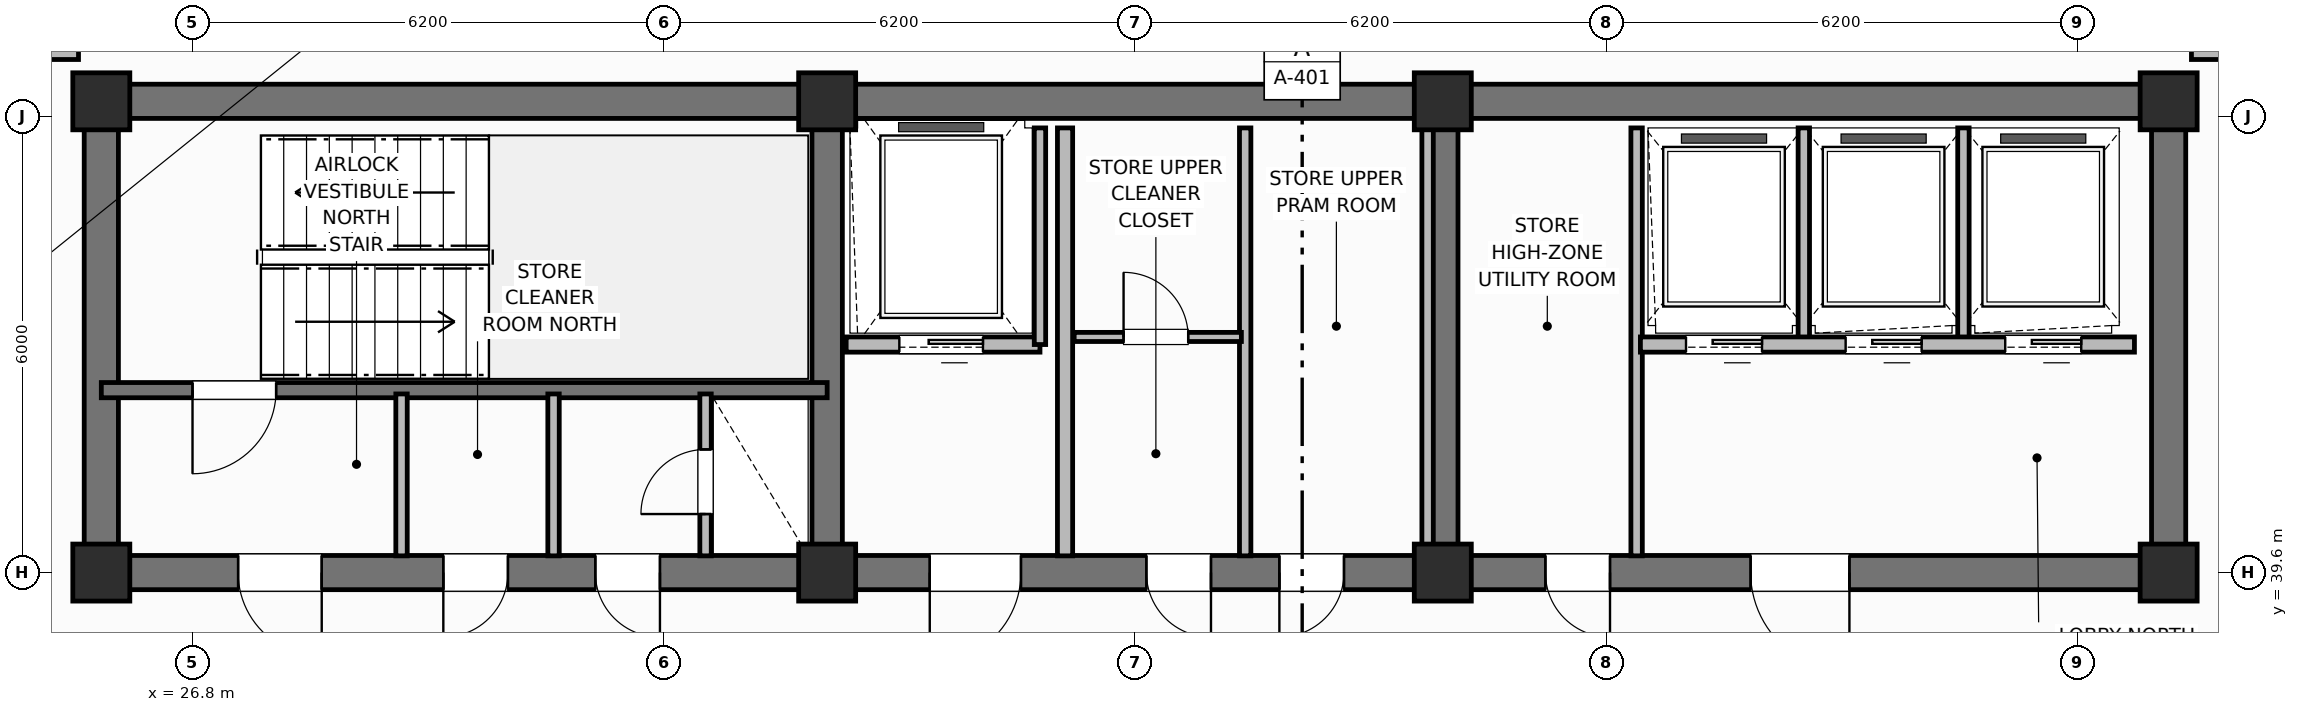
"""IFC4 building model, lengths in metres.
Left out: names, types, materials, properties, quantities, classifications, styles, units other than length and angle.
Written with IfcOpenShell. Run it as: python <this file> out.ifc"""

import sys

from ifc_helpers import new_model, si_unit, direction, frame, frame_2d, origin, origin_2d, place, context, subcontext, project, spatial, rectangle, extrude, element, fill, save


model = new_model("IFC4")
c1 = context("Model", 3, precision=1e-05, world=origin(), true_north=direction((0.0, 1.0)))
c2 = subcontext(c1, "Body", "Model", "MODEL_VIEW")
j1 = project(units=[si_unit("LENGTHUNIT", "METRE"), si_unit("PLANEANGLEUNIT", "RADIAN")], contexts=[c1])
p1 = place(None, origin())
s1 = spatial("IfcSite", under=j1, at=p1, CompositionType="ELEMENT")
p2 = place(p1, origin())
s2 = spatial("IfcBuilding", under=s1, at=p2, CompositionType="ELEMENT")
p3 = place(p2, frame((0.0, 0.0, 289.8)))
s3 = spatial("IfcBuildingStorey", under=s2, at=p3, CompositionType="ELEMENT", Elevation=289.8)
p4 = place(p3, frame((25.6, 45.8, 0.0), z_axis=(0.0, 0.0, 1.0), x_axis=(1.0, 0.0, 0.0)))
e1 = element("IfcWall", 1, at=p4, inside=s3, PredefinedType="SHEAR", context=c2, shape_type="SweptSolid", body=[
    extrude(rectangle(XDim=27.2, YDim=0.45, at=frame_2d((13.6, 0.0))), origin(), (0.0, 0.0, 1.0), 3.7),
])
for number, where, z_axis, x_axis in (
    (2, (25.6, 39.825, 0.0), (0.0, 0.0, 1.0), (0.0, 1.0, 0.0)),
    (3, (52.8, 39.825, 0.0), (0.0, 0.0, 1.0), (0.0, 1.0, 0.0)),
):
    element("IfcWall", number, at=place(p3, frame(where, z_axis=z_axis, x_axis=x_axis)), inside=s3, PredefinedType="SHEAR", context=c2, shape_type="SweptSolid", body=[
        extrude(rectangle(XDim=5.75, YDim=0.45, at=frame_2d((2.875, 0.0))), origin(), (0.0, 0.0, 1.0), 3.7),
    ])
p5 = place(p3, frame((52.8, 39.6, 0.0), z_axis=(0.0, 0.0, 1.0), x_axis=(-1.0, 0.0, 0.0)))
e4 = element("IfcWall", 4, at=p5, inside=s3, PredefinedType="SHEAR", context=c2, shape_type="SweptSolid", body=[
    extrude(rectangle(XDim=27.2, YDim=0.45, at=frame_2d((13.6, 0.0))), origin(), (0.0, 0.0, 1.0), 3.7),
])
p6 = place(p5, frame((24.3, 0.0, 0.0)))
e5 = element("IfcOpeningElement", 5, at=p6, cuts=e4, PredefinedType="OPENING", context=c2, shape_type="SweptSolid", body=[
    extrude(rectangle(XDim=1.1, YDim=2.15, at=frame_2d((0.55, 1.075))), frame((0.0, 0.235, 0.0), z_axis=(0.0, -1.0, 0.0), x_axis=(1.0, 0.0, 0.0)), (0.0, 0.0, 1.0), 0.47),
])
p7 = place(p5, frame((21.85, 0.0, 0.0)))
e6 = element("IfcOpeningElement", 6, at=p7, cuts=e4, PredefinedType="OPENING", context=c2, shape_type="SweptSolid", body=[
    extrude(rectangle(XDim=0.85, YDim=2.1, at=frame_2d((0.425, 1.05))), frame((0.0, 0.235, 0.0), z_axis=(0.0, -1.0, 0.0), x_axis=(1.0, 0.0, 0.0)), (0.0, 0.0, 1.0), 0.47),
])
p8 = place(p5, frame((19.85, 0.0, 0.0)))
e7 = element("IfcOpeningElement", 7, at=p8, cuts=e4, PredefinedType="OPENING", context=c2, shape_type="SweptSolid", body=[
    extrude(rectangle(XDim=0.85, YDim=2.1, at=frame_2d((0.425, 1.05))), frame((0.0, 0.235, 0.0), z_axis=(0.0, -1.0, 0.0), x_axis=(1.0, 0.0, 0.0)), (0.0, 0.0, 1.0), 0.47),
])
p9 = place(p5, frame((15.1, 0.0, 0.0)))
e8 = element("IfcOpeningElement", 8, at=p9, cuts=e4, PredefinedType="OPENING", context=c2, shape_type="SweptSolid", body=[
    extrude(rectangle(XDim=1.2, YDim=2.15, at=frame_2d((0.6, 1.075))), frame((0.0, 0.235, 0.0), z_axis=(0.0, -1.0, 0.0), x_axis=(1.0, 0.0, 0.0)), (0.0, 0.0, 1.0), 0.47),
])
p10 = place(p5, frame((12.6, 0.0, 0.0)))
e9 = element("IfcOpeningElement", 9, at=p10, cuts=e4, PredefinedType="OPENING", context=c2, shape_type="SweptSolid", body=[
    extrude(rectangle(XDim=0.85, YDim=2.1, at=frame_2d((0.425, 1.05))), frame((0.0, 0.235, 0.0), z_axis=(0.0, -1.0, 0.0), x_axis=(1.0, 0.0, 0.0)), (0.0, 0.0, 1.0), 0.47),
])
p11 = place(p5, frame((10.85, 0.0, 0.0)))
e10 = element("IfcOpeningElement", 10, at=p11, cuts=e4, PredefinedType="OPENING", context=c2, shape_type="SweptSolid", body=[
    extrude(rectangle(XDim=0.85, YDim=2.1, at=frame_2d((0.425, 1.05))), frame((0.0, 0.235, 0.0), z_axis=(0.0, -1.0, 0.0), x_axis=(1.0, 0.0, 0.0)), (0.0, 0.0, 1.0), 0.47),
])
p12 = place(p5, frame((7.35, 0.0, 0.0)))
e11 = element("IfcOpeningElement", 11, at=p12, cuts=e4, PredefinedType="OPENING", context=c2, shape_type="SweptSolid", body=[
    extrude(rectangle(XDim=0.85, YDim=2.1, at=frame_2d((0.425, 1.05))), frame((0.0, 0.235, 0.0), z_axis=(0.0, -1.0, 0.0), x_axis=(1.0, 0.0, 0.0)), (0.0, 0.0, 1.0), 0.47),
])
p13 = place(p5, frame((4.2, 0.0, 0.0)))
e12 = element("IfcOpeningElement", 12, at=p13, cuts=e4, PredefinedType="OPENING", context=c2, shape_type="SweptSolid", body=[
    extrude(rectangle(XDim=1.3, YDim=2.2, at=frame_2d((0.65, 1.1))), frame((0.0, 0.235, 0.0), z_axis=(0.0, -1.0, 0.0), x_axis=(1.0, 0.0, 0.0)), (0.0, 0.0, 1.0), 0.47),
])
for number, where, z_axis, x_axis in (
    (13, (35.15, 39.825, 0.0), (0.0, 0.0, 1.0), (0.0, 1.0, 0.0)),
    (14, (43.25, 39.825, 0.0), (0.0, 0.0, 1.0), (0.0, 1.0, 0.0)),
):
    element("IfcWall", number, at=place(p3, frame(where, z_axis=z_axis, x_axis=x_axis)), inside=s3, PredefinedType="SHEAR", context=c2, shape_type="SweptSolid", body=[
        extrude(rectangle(XDim=5.75, YDim=0.4, at=frame_2d((2.875, 0.0))), origin(), (0.0, 0.0, 1.0), 3.7),
    ])
for number, where, z_axis, x_axis in (
    (15, (25.6, 39.6, 0.0), (0.0, 0.0, 1.0), (1.0, 0.0, 0.0)),
    (16, (25.6, 45.8, 0.0), (0.0, 0.0, 1.0), (1.0, 0.0, 0.0)),
    (17, (35.15, 39.6, 0.0), (0.0, 0.0, 1.0), (1.0, 0.0, 0.0)),
    (18, (35.15, 45.8, 0.0), (0.0, 0.0, 1.0), (1.0, 0.0, 0.0)),
    (19, (43.25, 39.6, 0.0), (0.0, 0.0, 1.0), (1.0, 0.0, 0.0)),
    (20, (43.25, 45.8, 0.0), (0.0, 0.0, 1.0), (1.0, 0.0, 0.0)),
    (21, (52.8, 39.6, 0.0), (0.0, 0.0, 1.0), (1.0, 0.0, 0.0)),
    (22, (52.8, 45.8, 0.0), (0.0, 0.0, 1.0), (1.0, 0.0, 0.0)),
):
    element("IfcColumn", number, at=place(p3, frame(where, z_axis=z_axis, x_axis=x_axis)), inside=s3, PredefinedType="COLUMN", context=c2, shape_type="SweptSolid", body=[
        extrude(rectangle(XDim=0.75, YDim=0.75, at=origin_2d()), origin(), (0.0, 0.0, 1.0), 3.7),
    ])
p14 = place(p3, frame((35.15, 42.0, 0.0), z_axis=(0.0, 0.0, 1.0), x_axis=(-1.0, 0.0, 0.0)))
e23 = element("IfcWall", 23, at=p14, inside=s3, PredefinedType="SHEAR", context=c2, shape_type="SweptSolid", body=[
    extrude(rectangle(XDim=9.55, YDim=0.2, at=frame_2d((4.775, 0.0))), origin(), (0.0, 0.0, 1.0), 3.7),
])
p15 = place(p14, frame((7.25, 0.0, 0.0)))
e24 = element("IfcOpeningElement", 24, at=p15, cuts=e23, PredefinedType="OPENING", context=c2, shape_type="SweptSolid", body=[
    extrude(rectangle(XDim=1.1, YDim=2.15, at=frame_2d((0.55, 1.075))), frame((0.0, 0.11, 0.0), z_axis=(0.0, -1.0, 0.0), x_axis=(1.0, 0.0, 0.0)), (0.0, 0.0, 1.0), 0.22),
])
p16 = place(p3, frame((33.55, 39.82, 0.0), z_axis=(0.0, 0.0, 1.0), x_axis=(0.0, 1.0, 0.0)))
e25 = element("IfcWall", 25, at=p16, inside=s3, PredefinedType="PARTITIONING", context=c2, shape_type="SweptSolid", body=[
    extrude(rectangle(XDim=2.13, YDim=0.15, at=frame_2d((1.065, 0.0))), origin(), (0.0, 0.0, 1.0), 2.56),
])
p17 = place(p16, frame((0.55, 0.0, 0.0)))
e26 = element("IfcOpeningElement", 26, at=p17, cuts=e25, PredefinedType="OPENING", context=c2, shape_type="SweptSolid", body=[
    extrude(rectangle(XDim=0.85, YDim=2.05, at=frame_2d((0.425, 1.025))), frame((0.0, 0.085, 0.0), z_axis=(0.0, -1.0, 0.0), x_axis=(1.0, 0.0, 0.0)), (0.0, 0.0, 1.0), 0.17),
])
for number, where, z_axis, x_axis in (
    (27, (29.55, 39.82, 0.0), (0.0, 0.0, 1.0), (0.0, 1.0, 0.0)),
    (28, (31.55, 39.82, 0.0), (0.0, 0.0, 1.0), (0.0, 1.0, 0.0)),
):
    element("IfcWall", number, at=place(p3, frame(where, z_axis=z_axis, x_axis=x_axis)), inside=s3, PredefinedType="PARTITIONING", context=c2, shape_type="SweptSolid", body=[
        extrude(rectangle(XDim=2.13, YDim=0.15, at=frame_2d((1.065, 0.0))), origin(), (0.0, 0.0, 1.0), 2.56),
    ])
p18 = place(p3, frame((37.95, 42.6, 0.0), z_axis=(0.0, 0.0, 1.0), x_axis=(-1.0, 0.0, 0.0)))
e29 = element("IfcWall", 29, at=p18, inside=s3, PredefinedType="PARTITIONING", context=c2, shape_type="SweptSolid", body=[
    extrude(rectangle(XDim=2.55, YDim=0.2, at=frame_2d((1.275, 0.0))), origin(), (0.0, 0.0, 1.0), 2.33),
])
p19 = place(p18, frame((0.75, 0.0, 0.0)))
e30 = element("IfcOpeningElement", 30, at=p19, cuts=e29, PredefinedType="OPENING", context=c2, shape_type="SweptSolid", body=[
    extrude(rectangle(XDim=1.1, YDim=2.15, at=frame_2d((0.55, 1.075))), frame((0.0, 0.11, 0.0), z_axis=(0.0, -1.0, 0.0), x_axis=(1.0, 0.0, 0.0)), (0.0, 0.0, 1.0), 0.22),
])
p20 = place(p3, frame((37.95, 42.6, 0.0), z_axis=(0.0, 0.0, 1.0), x_axis=(0.0, 1.0, 0.0)))
e31 = element("IfcWall", 31, at=p20, inside=s3, PredefinedType="PARTITIONING", context=c2, shape_type="SweptSolid", body=[
    extrude(rectangle(XDim=2.85, YDim=0.15, at=frame_2d((1.425, 0.0))), origin(), (0.0, 0.0, 1.0), 2.56),
])
p21 = place(p3, frame((38.28, 39.82, 0.0), z_axis=(0.0, 0.0, 1.0), x_axis=(0.0, 1.0, 0.0)))
e32 = element("IfcWall", 32, at=p21, inside=s3, PredefinedType="PARTITIONING", context=c2, shape_type="SweptSolid", body=[
    extrude(rectangle(XDim=5.63, YDim=0.2, at=frame_2d((2.815, 0.0))), origin(), (0.0, 0.0, 1.0), 2.56),
])
for number, where, z_axis, x_axis in (
    (33, (43.05, 39.82, 0.0), (0.0, 0.0, 1.0), (0.0, 1.0, 0.0)),
    (34, (40.65, 39.82, 0.0), (0.0, 0.0, 1.0), (0.0, 1.0, 0.0)),
):
    element("IfcWall", number, at=place(p3, frame(where, z_axis=z_axis, x_axis=x_axis)), inside=s3, PredefinedType="PARTITIONING", context=c2, shape_type="SweptSolid", body=[
        extrude(rectangle(XDim=5.63, YDim=0.15, at=frame_2d((2.815, 0.0))), origin(), (0.0, 0.0, 1.0), 2.56),
    ])
p22 = place(p3, frame((38.4, 42.7, 0.0), z_axis=(0.0, 0.0, 1.0), x_axis=(1.0, 0.0, 0.0)))
e35 = element("IfcWall", 35, at=p22, inside=s3, PredefinedType="PARTITIONING", context=c2, shape_type="SweptSolid", body=[
    extrude(rectangle(XDim=2.2, YDim=0.12, at=frame_2d((1.1, 0.0))), origin(), (0.0, 0.0, 1.0), 2.33),
])
p23 = place(p22, frame((0.65, 0.0, 0.0)))
e36 = element("IfcOpeningElement", 36, at=p23, cuts=e35, PredefinedType="OPENING", context=c2, shape_type="SweptSolid", body=[
    extrude(rectangle(XDim=0.85, YDim=2.1, at=frame_2d((0.425, 1.05))), frame((0.0, 0.07, 0.0), z_axis=(0.0, -1.0, 0.0), x_axis=(1.0, 0.0, 0.0)), (0.0, 0.0, 1.0), 0.14),
])
p24 = place(p3, frame((45.8, 39.82, 0.0), z_axis=(0.0, 0.0, 1.0), x_axis=(0.0, 1.0, 0.0)))
e37 = element("IfcWall", 37, at=p24, inside=s3, PredefinedType="PARTITIONING", context=c2, shape_type="SweptSolid", body=[
    extrude(rectangle(XDim=5.63, YDim=0.15, at=frame_2d((2.815, 0.0))), origin(), (0.0, 0.0, 1.0), 2.56),
])
for number, where, z_axis, x_axis in (
    (38, (48.0, 42.65, 0.0), (0.0, 0.0, 1.0), (0.0, 1.0, 0.0)),
    (39, (50.1, 42.65, 0.0), (0.0, 0.0, 1.0), (0.0, 1.0, 0.0)),
):
    element("IfcWall", number, at=place(p3, frame(where, z_axis=z_axis, x_axis=x_axis)), inside=s3, PredefinedType="PARTITIONING", context=c2, shape_type="SweptSolid", body=[
        extrude(rectangle(XDim=2.8, YDim=0.15, at=frame_2d((1.4, 0.0))), origin(), (0.0, 0.0, 1.0), 2.56),
    ])
p25 = place(p3, frame((52.35, 42.6, 0.0), z_axis=(0.0, 0.0, 1.0), x_axis=(-1.0, 0.0, 0.0)))
e40 = element("IfcWall", 40, at=p25, inside=s3, PredefinedType="PARTITIONING", context=c2, shape_type="SweptSolid", body=[
    extrude(rectangle(XDim=6.5, YDim=0.2, at=frame_2d((3.25, 0.0))), origin(), (0.0, 0.0, 1.0), 2.56),
])
p26 = place(p25, frame((4.9, 0.0, 0.0)))
e41 = element("IfcOpeningElement", 41, at=p26, cuts=e40, PredefinedType="OPENING", context=c2, shape_type="SweptSolid", body=[
    extrude(rectangle(XDim=1.0, YDim=2.15, at=frame_2d((0.5, 1.075))), frame((0.0, 0.11, 0.0), z_axis=(0.0, -1.0, 0.0), x_axis=(1.0, 0.0, 0.0)), (0.0, 0.0, 1.0), 0.22),
])
p27 = place(p25, frame((2.8, 0.0, 0.0)))
e42 = element("IfcOpeningElement", 42, at=p27, cuts=e40, PredefinedType="OPENING", context=c2, shape_type="SweptSolid", body=[
    extrude(rectangle(XDim=1.0, YDim=2.15, at=frame_2d((0.5, 1.075))), frame((0.0, 0.11, 0.0), z_axis=(0.0, -1.0, 0.0), x_axis=(1.0, 0.0, 0.0)), (0.0, 0.0, 1.0), 0.22),
])
p28 = place(p25, frame((0.7, 0.0, 0.0)))
e43 = element("IfcOpeningElement", 43, at=p28, cuts=e40, PredefinedType="OPENING", context=c2, shape_type="SweptSolid", body=[
    extrude(rectangle(XDim=1.0, YDim=2.15, at=frame_2d((0.5, 1.075))), frame((0.0, 0.11, 0.0), z_axis=(0.0, -1.0, 0.0), x_axis=(1.0, 0.0, 0.0)), (0.0, 0.0, 1.0), 0.22),
])
p29 = place(p3, frame((21.546, 46.45, 0.0), z_axis=(0.0, 0.0, 1.0), x_axis=(1.0, 0.0, 0.0)))
e44 = element("IfcWall", 44, at=p29, inside=s3, PredefinedType="PARTITIONING", context=c2, shape_type="SweptSolid", body=[
    extrude(rectangle(XDim=3.754, YDim=0.2, at=frame_2d((1.877, 0.0))), origin(), (0.0, 0.0, 1.0), 2.56),
])
p30 = place(p3, frame((53.1, 46.45, 0.0), z_axis=(0.0, 0.0, 1.0), x_axis=(1.0, 0.0, 0.0)))
e45 = element("IfcWall", 45, at=p30, inside=s3, PredefinedType="PARTITIONING", context=c2, shape_type="SweptSolid", body=[
    extrude(rectangle(XDim=3.754, YDim=0.2, at=frame_2d((1.877, 0.0))), origin(), (0.0, 0.0, 1.0), 2.56),
])
p31 = place(p15, origin())
e46 = element("IfcDoor", 46, at=p31, inside=s3, OperationType="SINGLE_SWING_RIGHT", PredefinedType="DOOR", context=c2, shape_type="SweptSolid", body=[
    extrude(rectangle(XDim=1.1, YDim=2.15, at=frame_2d((0.55, 1.075))), frame((0.0, 0.025, 0.0), z_axis=(0.0, -1.0, 0.0), x_axis=(1.0, 0.0, 0.0)), (0.0, 0.0, 1.0), 0.05),
])
fill(e24, e46)
p32 = place(p17, origin())
e47 = element("IfcDoor", 47, at=p32, inside=s3, OperationType="SINGLE_SWING_LEFT", PredefinedType="TRAPDOOR", context=c2, shape_type="SweptSolid", body=[
    extrude(rectangle(XDim=0.85, YDim=2.05, at=frame_2d((0.425, 1.025))), frame((0.0, 0.025, 0.0), z_axis=(0.0, -1.0, 0.0), x_axis=(1.0, 0.0, 0.0)), (0.0, 0.0, 1.0), 0.05),
])
fill(e26, e47)
p33 = place(p19, origin())
e48 = element("IfcDoor", 48, at=p33, inside=s3, OperationType="SLIDING_TO_LEFT", PredefinedType="DOOR", context=c2, shape_type="SweptSolid", body=[
    extrude(rectangle(XDim=1.1, YDim=2.15, at=frame_2d((0.55, 1.075))), frame((0.0, 0.025, 0.0), z_axis=(0.0, -1.0, 0.0), x_axis=(1.0, 0.0, 0.0)), (0.0, 0.0, 1.0), 0.05),
])
fill(e30, e48)
p34 = place(p23, origin())
e49 = element("IfcDoor", 49, at=p34, inside=s3, OperationType="SINGLE_SWING_LEFT", PredefinedType="DOOR", context=c2, shape_type="SweptSolid", body=[
    extrude(rectangle(XDim=0.85, YDim=2.1, at=frame_2d((0.425, 1.05))), frame((0.0, 0.025, 0.0), z_axis=(0.0, -1.0, 0.0), x_axis=(1.0, 0.0, 0.0)), (0.0, 0.0, 1.0), 0.05),
])
fill(e36, e49)
p35 = place(p26, origin())
e50 = element("IfcDoor", 50, at=p35, inside=s3, OperationType="SLIDING_TO_LEFT", PredefinedType="DOOR", context=c2, shape_type="SweptSolid", body=[
    extrude(rectangle(XDim=1.0, YDim=2.15, at=frame_2d((0.5, 1.075))), frame((0.0, 0.025, 0.0), z_axis=(0.0, -1.0, 0.0), x_axis=(1.0, 0.0, 0.0)), (0.0, 0.0, 1.0), 0.05),
])
fill(e41, e50)
p36 = place(p27, origin())
e51 = element("IfcDoor", 51, at=p36, inside=s3, OperationType="SLIDING_TO_LEFT", PredefinedType="DOOR", context=c2, shape_type="SweptSolid", body=[
    extrude(rectangle(XDim=1.0, YDim=2.15, at=frame_2d((0.5, 1.075))), frame((0.0, 0.025, 0.0), z_axis=(0.0, -1.0, 0.0), x_axis=(1.0, 0.0, 0.0)), (0.0, 0.0, 1.0), 0.05),
])
fill(e42, e51)
p37 = place(p28, origin())
e52 = element("IfcDoor", 52, at=p37, inside=s3, OperationType="SLIDING_TO_LEFT", PredefinedType="DOOR", context=c2, shape_type="SweptSolid", body=[
    extrude(rectangle(XDim=1.0, YDim=2.15, at=frame_2d((0.5, 1.075))), frame((0.0, 0.025, 0.0), z_axis=(0.0, -1.0, 0.0), x_axis=(1.0, 0.0, 0.0)), (0.0, 0.0, 1.0), 0.05),
])
fill(e43, e52)
p38 = place(p6, origin())
e53 = element("IfcDoor", 53, at=p38, inside=s3, OperationType="SINGLE_SWING_LEFT", PredefinedType="DOOR", context=c2, shape_type="SweptSolid", body=[
    extrude(rectangle(XDim=1.1, YDim=2.15, at=frame_2d((0.55, 1.075))), frame((0.0, 0.025, 0.0), z_axis=(0.0, -1.0, 0.0), x_axis=(1.0, 0.0, 0.0)), (0.0, 0.0, 1.0), 0.05),
])
fill(e5, e53)
p39 = place(p7, origin())
e54 = element("IfcDoor", 54, at=p39, inside=s3, OperationType="SINGLE_SWING_RIGHT", PredefinedType="DOOR", context=c2, shape_type="SweptSolid", body=[
    extrude(rectangle(XDim=0.85, YDim=2.1, at=frame_2d((0.425, 1.05))), frame((0.0, 0.025, 0.0), z_axis=(0.0, -1.0, 0.0), x_axis=(1.0, 0.0, 0.0)), (0.0, 0.0, 1.0), 0.05),
])
fill(e6, e54)
p40 = place(p8, origin())
e55 = element("IfcDoor", 55, at=p40, inside=s3, OperationType="SINGLE_SWING_LEFT", PredefinedType="DOOR", context=c2, shape_type="SweptSolid", body=[
    extrude(rectangle(XDim=0.85, YDim=2.1, at=frame_2d((0.425, 1.05))), frame((0.0, 0.025, 0.0), z_axis=(0.0, -1.0, 0.0), x_axis=(1.0, 0.0, 0.0)), (0.0, 0.0, 1.0), 0.05),
])
fill(e7, e55)
p41 = place(p9, origin())
e56 = element("IfcDoor", 56, at=p41, inside=s3, OperationType="SINGLE_SWING_RIGHT", PredefinedType="DOOR", context=c2, shape_type="SweptSolid", body=[
    extrude(rectangle(XDim=1.2, YDim=2.15, at=frame_2d((0.6, 1.075))), frame((0.0, 0.025, 0.0), z_axis=(0.0, -1.0, 0.0), x_axis=(1.0, 0.0, 0.0)), (0.0, 0.0, 1.0), 0.05),
])
fill(e8, e56)
p42 = place(p10, origin())
e57 = element("IfcDoor", 57, at=p42, inside=s3, OperationType="SINGLE_SWING_LEFT", PredefinedType="DOOR", context=c2, shape_type="SweptSolid", body=[
    extrude(rectangle(XDim=0.85, YDim=2.1, at=frame_2d((0.425, 1.05))), frame((0.0, 0.025, 0.0), z_axis=(0.0, -1.0, 0.0), x_axis=(1.0, 0.0, 0.0)), (0.0, 0.0, 1.0), 0.05),
])
fill(e9, e57)
p43 = place(p11, origin())
e58 = element("IfcDoor", 58, at=p43, inside=s3, OperationType="SINGLE_SWING_RIGHT", PredefinedType="DOOR", context=c2, shape_type="SweptSolid", body=[
    extrude(rectangle(XDim=0.85, YDim=2.1, at=frame_2d((0.425, 1.05))), frame((0.0, 0.025, 0.0), z_axis=(0.0, -1.0, 0.0), x_axis=(1.0, 0.0, 0.0)), (0.0, 0.0, 1.0), 0.05),
])
fill(e10, e58)
p44 = place(p12, origin())
e59 = element("IfcDoor", 59, at=p44, inside=s3, OperationType="SINGLE_SWING_LEFT", PredefinedType="DOOR", context=c2, shape_type="SweptSolid", body=[
    extrude(rectangle(XDim=0.85, YDim=2.1, at=frame_2d((0.425, 1.05))), frame((0.0, 0.025, 0.0), z_axis=(0.0, -1.0, 0.0), x_axis=(1.0, 0.0, 0.0)), (0.0, 0.0, 1.0), 0.05),
])
fill(e11, e59)
p45 = place(p13, origin())
e60 = element("IfcDoor", 60, at=p45, inside=s3, OperationType="SINGLE_SWING_LEFT", PredefinedType="DOOR", context=c2, shape_type="SweptSolid", body=[
    extrude(rectangle(XDim=1.3, YDim=2.2, at=frame_2d((0.65, 1.1))), frame((0.0, 0.025, 0.0), z_axis=(0.0, -1.0, 0.0), x_axis=(1.0, 0.0, 0.0)), (0.0, 0.0, 1.0), 0.05),
])
fill(e12, e60)
save(model, sys.argv[1])
